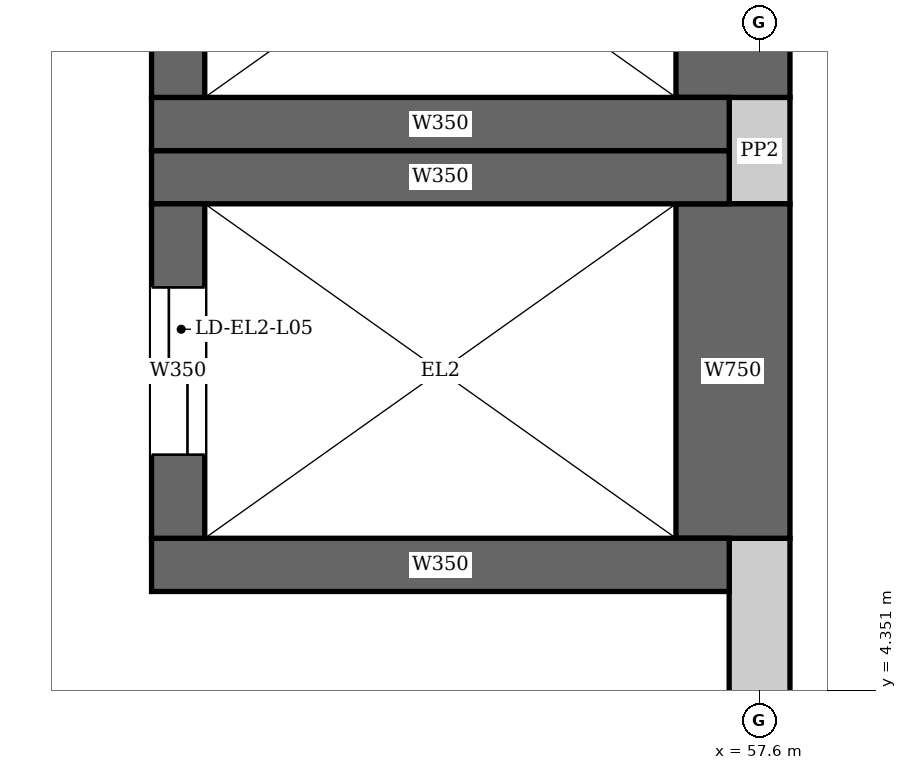
"""IFC4 building model, lengths in metres.
Left out: names, types, materials, properties, quantities, classifications, styles, units other than length and angle.
Written with IfcOpenShell. Run it as: python <this file> out.ifc"""

import sys

from ifc_helpers import new_model, si_unit, direction, frame, frame_2d, origin, place, context, subcontext, project, spatial, rectangle, extrude, element, fill, save


model = new_model("IFC4")
c1 = context("Model", 3, precision=1e-05, world=origin(), true_north=direction((0.0, 1.0)))
c2 = subcontext(c1, "Body", "Model", "MODEL_VIEW")
j1 = project(units=[si_unit("LENGTHUNIT", "METRE"), si_unit("PLANEANGLEUNIT", "RADIAN")], contexts=[c1])
p1 = place(None, origin())
s1 = spatial("IfcSite", under=j1, at=p1, CompositionType="ELEMENT")
p2 = place(p1, origin())
s2 = spatial("IfcBuilding", under=s1, at=p2, CompositionType="ELEMENT")
p3 = place(p2, frame((0.0, 0.0, 31.9)))
s3 = spatial("IfcBuildingStorey", under=s2, at=p3, CompositionType="ELEMENT", Elevation=31.9)
for number, where, z_axis, x_axis in (
    (1, (53.6, 5.175, 0.0), (0.0, 0.0, 1.0), (1.0, 0.0, 0.0)),
    (2, (53.6, 7.725, 0.0), (0.0, 0.0, 1.0), (1.0, 0.0, 0.0)),
):
    element("IfcWall", number, at=place(p3, frame(where, z_axis=z_axis, x_axis=x_axis)), inside=s3, PredefinedType="SHEAR", context=c2, shape_type="SweptSolid", body=[
        extrude(rectangle(XDim=3.8, YDim=0.35, at=frame_2d((1.9, 0.0))), origin(), (0.0, 0.0, 1.0), 4.2),
    ])
p4 = place(p3, frame((53.775, 5.35, 0.0), z_axis=(0.0, 0.0, 1.0), x_axis=(0.0, 1.0, 0.0)))
e3 = element("IfcWall", 3, at=p4, inside=s3, PredefinedType="SHEAR", context=c2, shape_type="SweptSolid", body=[
    extrude(rectangle(XDim=2.2, YDim=0.35, at=frame_2d((1.1, 0.0))), origin(), (0.0, 0.0, 1.0), 4.2),
])
p5 = place(p4, frame((0.55, 0.0, 0.0)))
e4 = element("IfcOpeningElement", 4, at=p5, cuts=e3, PredefinedType="OPENING", context=c2, shape_type="SweptSolid", body=[
    extrude(rectangle(XDim=1.1, YDim=2.1, at=frame_2d((0.55, 1.05))), frame((0.0, 0.185, 0.0), z_axis=(0.0, -1.0, 0.0), x_axis=(1.0, 0.0, 0.0)), (0.0, 0.0, 1.0), 0.37),
])
p6 = place(p3, frame((57.425, 5.35, 0.0), z_axis=(0.0, 0.0, 1.0), x_axis=(0.0, 1.0, 0.0)))
e5 = element("IfcWall", 5, at=p6, inside=s3, PredefinedType="SHEAR", context=c2, shape_type="SweptSolid", body=[
    extrude(rectangle(XDim=2.2, YDim=0.75, at=frame_2d((1.1, 0.0))), origin(), (0.0, 0.0, 1.0), 4.2),
])
p7 = place(p3, frame((53.6, 8.075, 0.0), z_axis=(0.0, 0.0, 1.0), x_axis=(1.0, 0.0, 0.0)))
e6 = element("IfcWall", 6, at=p7, inside=s3, PredefinedType="SHEAR", context=c2, shape_type="SweptSolid", body=[
    extrude(rectangle(XDim=3.8, YDim=0.35, at=frame_2d((1.9, 0.0))), origin(), (0.0, 0.0, 1.0), 4.2),
])
p8 = place(p3, frame((53.775, 8.25, 0.0), z_axis=(0.0, 0.0, 1.0), x_axis=(0.0, 1.0, 0.0)))
e7 = element("IfcWall", 7, at=p8, inside=s3, PredefinedType="SHEAR", context=c2, shape_type="SweptSolid", body=[
    extrude(rectangle(XDim=2.2, YDim=0.35, at=frame_2d((1.1, 0.0))), origin(), (0.0, 0.0, 1.0), 4.2),
])
p9 = place(p8, frame((0.55, 0.0, 0.0)))
e8 = element("IfcOpeningElement", 8, at=p9, cuts=e7, PredefinedType="OPENING", context=c2, shape_type="SweptSolid", body=[
    extrude(rectangle(XDim=1.1, YDim=2.1, at=frame_2d((0.55, 1.05))), frame((0.0, 0.185, 0.0), z_axis=(0.0, -1.0, 0.0), x_axis=(1.0, 0.0, 0.0)), (0.0, 0.0, 1.0), 0.37),
])
p10 = place(p3, frame((57.425, 8.25, 0.0), z_axis=(0.0, 0.0, 1.0), x_axis=(0.0, 1.0, 0.0)))
e9 = element("IfcWall", 9, at=p10, inside=s3, PredefinedType="SHEAR", context=c2, shape_type="SweptSolid", body=[
    extrude(rectangle(XDim=2.2, YDim=0.75, at=frame_2d((1.1, 0.0))), origin(), (0.0, 0.0, 1.0), 4.2),
])
p11 = place(p3, frame((57.6, -0.2, 0.0), z_axis=(0.0, 0.0, 1.0), x_axis=(0.0, 1.0, 0.0)))
e10 = element("IfcWall", 10, at=p11, inside=s3, PredefinedType="PARAPET", context=c2, shape_type="SweptSolid", body=[
    extrude(rectangle(XDim=5.55, YDim=0.4, at=frame_2d((2.775, 0.0))), origin(), (0.0, 0.0, 1.0), 1.1),
])
p12 = place(p3, frame((57.6, 7.55, 0.0), z_axis=(0.0, 0.0, 1.0), x_axis=(0.0, 1.0, 0.0)))
e11 = element("IfcWall", 11, at=p12, inside=s3, PredefinedType="PARAPET", context=c2, shape_type="SweptSolid", body=[
    extrude(rectangle(XDim=0.7, YDim=0.4, at=frame_2d((0.35, 0.0))), origin(), (0.0, 0.0, 1.0), 1.1),
])
p13 = place(p5, origin())
e12 = element("IfcDoor", 12, at=p13, inside=s3, OperationType="DOUBLE_DOOR_SLIDING", PredefinedType="DOOR", context=c2, shape_type="SweptSolid", body=[
    extrude(rectangle(XDim=1.1, YDim=2.1, at=frame_2d((0.55, 1.05))), frame((0.0, 0.025, 0.0), z_axis=(0.0, -1.0, 0.0), x_axis=(1.0, 0.0, 0.0)), (0.0, 0.0, 1.0), 0.05),
])
fill(e4, e12)
save(model, sys.argv[1])
